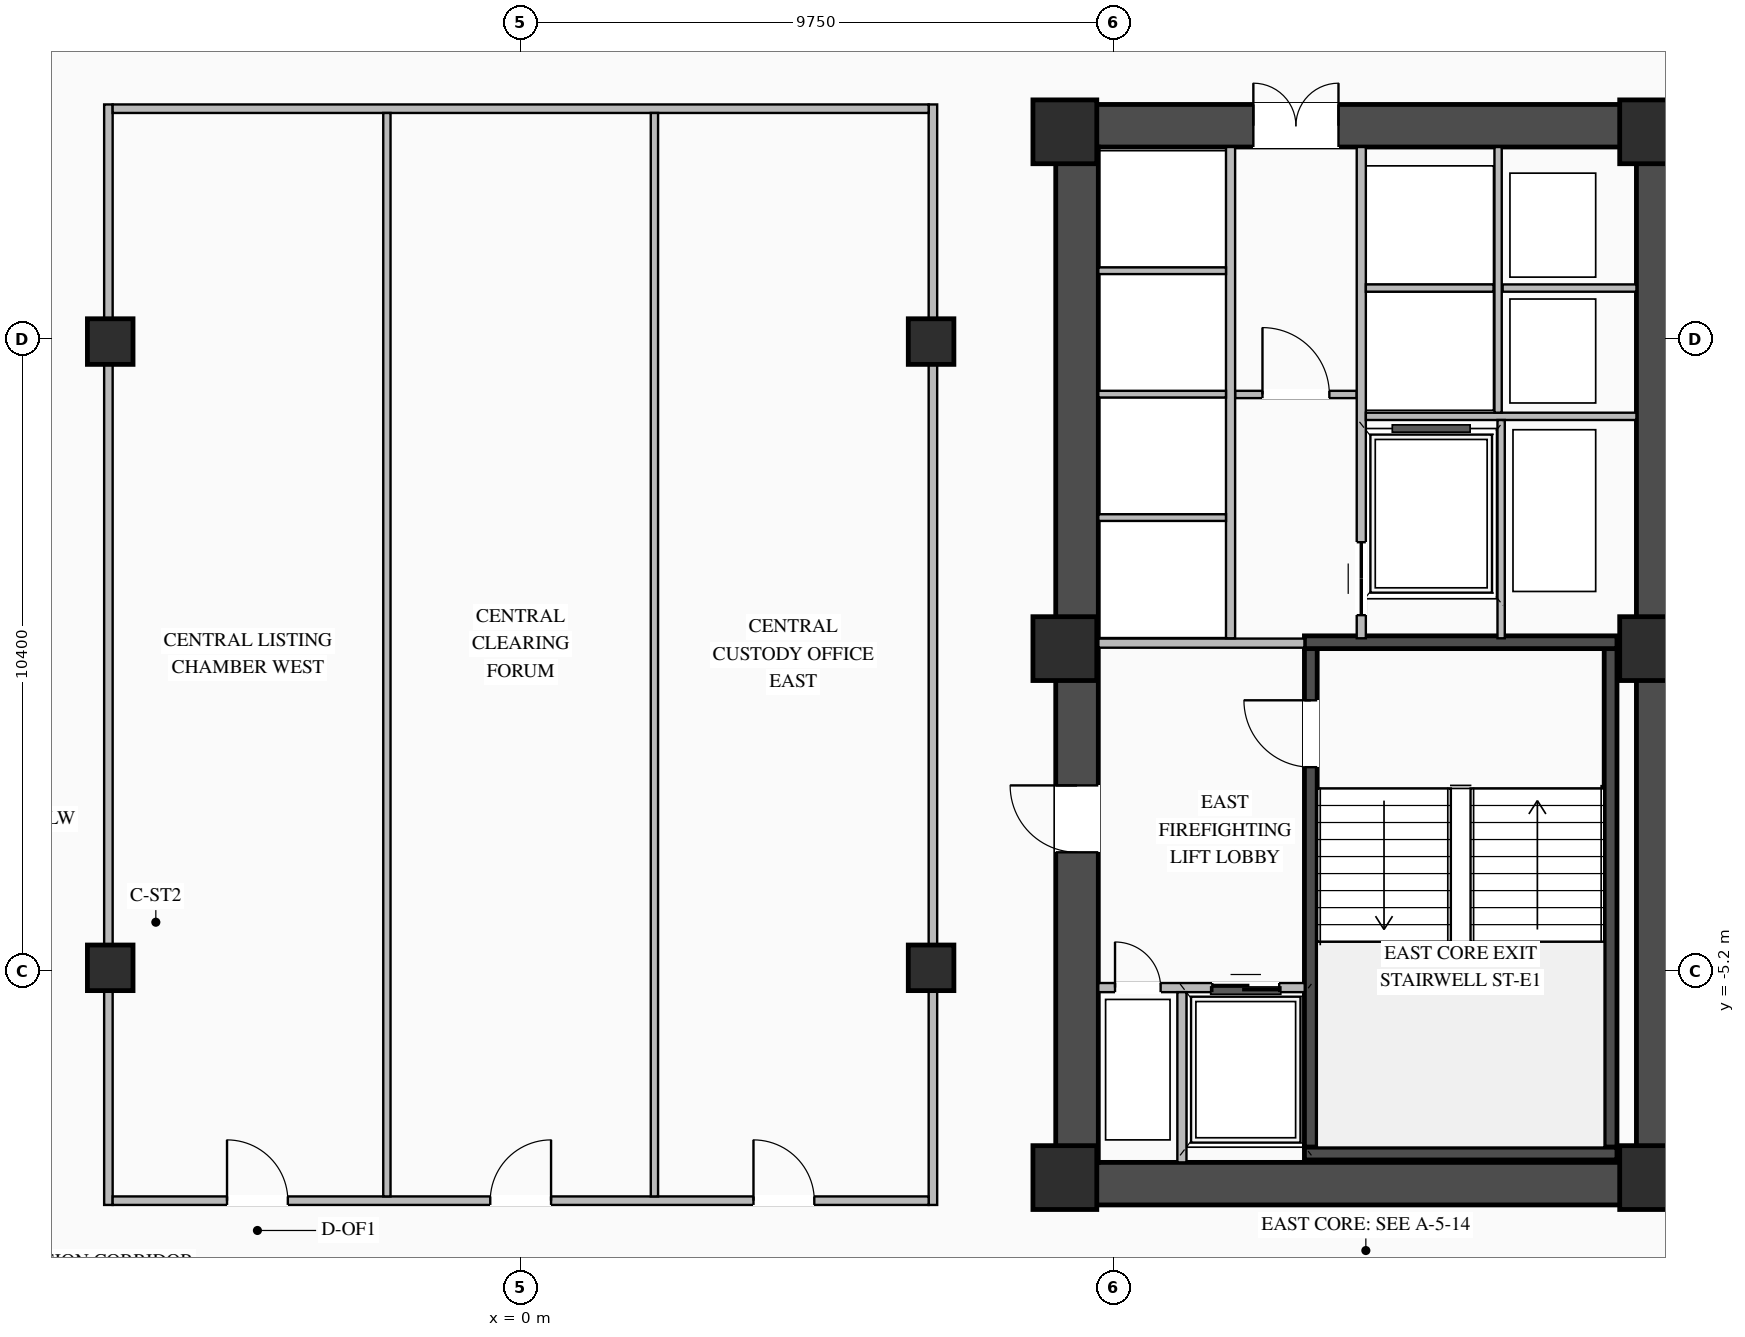
"""IFC4 building model, lengths in metres.
Left out: names, types, materials, properties, quantities, classifications, styles, units other than length and angle.
Written with IfcOpenShell. Run it as: python <this file> out.ifc"""

import sys

from ifc_helpers import new_model, si_unit, direction, frame, frame_2d, origin, origin_2d, place, context, subcontext, project, spatial, rectangle, i_section, extrude, element, fill, save


model = new_model("IFC4")
c1 = context("Model", 3, precision=1e-05, world=origin(), true_north=direction((0.0, 1.0)))
c2 = subcontext(c1, "Body", "Model", "MODEL_VIEW")
j1 = project(units=[si_unit("LENGTHUNIT", "METRE"), si_unit("PLANEANGLEUNIT", "RADIAN")], contexts=[c1])
p1 = place(None, origin())
s1 = spatial("IfcSite", under=j1, at=p1, CompositionType="ELEMENT")
p2 = place(p1, origin())
s2 = spatial("IfcBuilding", under=s1, at=p2, CompositionType="ELEMENT")
p3 = place(p2, frame((0.0, 0.0, 108.7)))
s3 = spatial("IfcBuildingStorey", under=s2, at=p3, CompositionType="ELEMENT", Elevation=108.7)
p4 = place(p3, frame((8.8, -8.7, 0.0), z_axis=(0.0, 0.0, 1.0), x_axis=(1.0, 0.0, 0.0)))
e1 = element("IfcWall", 1, at=p4, inside=s3, PredefinedType="SHEAR", context=c2, shape_type="SweptSolid", body=[
    extrude(rectangle(XDim=10.25, YDim=0.7, at=frame_2d((5.125, 0.0))), origin(), (0.0, 0.0, 1.0), 3.17),
])
p5 = place(p3, frame((8.8, 8.7, 0.0), z_axis=(0.0, 0.0, 1.0), x_axis=(1.0, 0.0, 0.0)))
e2 = element("IfcWall", 2, at=p5, inside=s3, PredefinedType="SHEAR", context=c2, shape_type="SweptSolid", body=[
    extrude(rectangle(XDim=10.25, YDim=0.7, at=frame_2d((5.125, 0.0))), origin(), (0.0, 0.0, 1.0), 3.17),
])
p6 = place(p5, frame((3.25, 0.0, 0.0)))
e3 = element("IfcOpeningElement", 3, at=p6, cuts=e2, PredefinedType="OPENING", context=c2, shape_type="SweptSolid", body=[
    extrude(rectangle(XDim=1.4, YDim=2.05, at=frame_2d((0.7, 1.025))), frame((0.0, 0.36, 0.0), z_axis=(0.0, -1.0, 0.0), x_axis=(1.0, 0.0, 0.0)), (0.0, 0.0, 1.0), 0.72),
])
p7 = place(p3, frame((9.15, -8.35, 0.0), z_axis=(0.0, 0.0, 1.0), x_axis=(0.0, 1.0, 0.0)))
e4 = element("IfcWall", 4, at=p7, inside=s3, PredefinedType="SHEAR", context=c2, shape_type="SweptSolid", body=[
    extrude(rectangle(XDim=16.7, YDim=0.7, at=frame_2d((8.35, 0.0))), origin(), (0.0, 0.0, 1.0), 3.17),
])
p8 = place(p7, frame((5.1, 0.0, 0.0)))
e5 = element("IfcOpeningElement", 5, at=p8, cuts=e4, PredefinedType="OPENING", context=c2, shape_type="SweptSolid", body=[
    extrude(rectangle(XDim=1.1, YDim=2.08, at=frame_2d((0.55, 1.04))), frame((0.0, 0.36, 0.0), z_axis=(0.0, -1.0, 0.0), x_axis=(1.0, 0.0, 0.0)), (0.0, 0.0, 1.0), 0.72),
])
p9 = place(p3, frame((18.7, -8.35, 0.0), z_axis=(0.0, 0.0, 1.0), x_axis=(0.0, 1.0, 0.0)))
e6 = element("IfcWall", 6, at=p9, inside=s3, PredefinedType="SHEAR", context=c2, shape_type="SweptSolid", body=[
    extrude(rectangle(XDim=16.7, YDim=0.7, at=frame_2d((8.35, 0.0))), origin(), (0.0, 0.0, 1.0), 3.17),
])
p10 = place(p3, frame((12.995, -8.1, 0.0), z_axis=(0.0, 0.0, 1.0), x_axis=(0.0, 1.0, 0.0)))
e7 = element("IfcWall", 7, at=p10, inside=s3, PredefinedType="SHEAR", context=c2, shape_type="SweptSolid", body=[
    extrude(rectangle(XDim=8.2, YDim=0.21, at=frame_2d((4.1, 0.0))), origin(), (0.0, 0.0, 1.0), 3.17),
])
p11 = place(p10, frame((6.25, 0.0, 0.0)))
e8 = element("IfcOpeningElement", 8, at=p11, cuts=e7, PredefinedType="OPENING", context=c2, shape_type="SweptSolid", body=[
    extrude(rectangle(XDim=1.1, YDim=2.15, at=frame_2d((0.55, 1.075))), frame((0.0, 0.115, 0.0), z_axis=(0.0, -1.0, 0.0), x_axis=(1.0, 0.0, 0.0)), (0.0, 0.0, 1.0), 0.23),
])
p12 = place(p3, frame((17.925, -8.1, 0.0), z_axis=(0.0, 0.0, 1.0), x_axis=(0.0, 1.0, 0.0)))
e9 = element("IfcWall", 9, at=p12, inside=s3, PredefinedType="SHEAR", context=c2, shape_type="SweptSolid", body=[
    extrude(rectangle(XDim=8.2, YDim=0.21, at=frame_2d((4.1, 0.0))), origin(), (0.0, 0.0, 1.0), 3.17),
])
for number, where, z_axis, x_axis in (
    (10, (12.89, -8.205, 0.0), (0.0, 0.0, 1.0), (1.0, 0.0, 0.0)),
    (11, (18.03, 0.205, 0.0), (0.0, 0.0, 1.0), (-1.0, 0.0, 0.0)),
):
    element("IfcWall", number, at=place(p3, frame(where, z_axis=z_axis, x_axis=x_axis)), inside=s3, PredefinedType="SHEAR", context=c2, shape_type="SweptSolid", body=[
        extrude(rectangle(XDim=5.14, YDim=0.21, at=frame_2d((2.57, 0.0))), origin(), (0.0, 0.0, 1.0), 3.17),
    ])
for number, where, z_axis, x_axis in (
    (12, (8.95, -8.6, 0.0), (0.0, 0.0, 1.0), (1.0, 0.0, 0.0)),
    (13, (8.95, 0.1, 0.0), (0.0, 0.0, 1.0), (1.0, 0.0, 0.0)),
    (14, (8.95, 8.6, 0.0), (0.0, 0.0, 1.0), (1.0, 0.0, 0.0)),
    (15, (18.6, -8.6, 0.0), (0.0, 0.0, 1.0), (1.0, 0.0, 0.0)),
    (16, (18.6, 0.1, 0.0), (0.0, 0.0, 1.0), (1.0, 0.0, 0.0)),
    (17, (18.6, 8.6, 0.0), (0.0, 0.0, 1.0), (1.0, 0.0, 0.0)),
):
    element("IfcColumn", number, at=place(p3, frame(where, z_axis=z_axis, x_axis=x_axis)), inside=s3, PredefinedType="COLUMN", context=c2, shape_type="SweptSolid", body=[
        extrude(rectangle(XDim=1.05, YDim=1.05, at=origin_2d()), origin(), (0.0, 0.0, 1.0), 3.45),
    ])
for number, where, z_axis, x_axis in (
    (18, (-6.75, -5.15, 0.0), (0.0, 0.0, 1.0), (1.0, 0.0, 0.0)),
    (19, (-6.75, 5.15, 0.0), (0.0, 0.0, 1.0), (1.0, 0.0, 0.0)),
    (20, (6.75, -5.15, 0.0), (0.0, 0.0, 1.0), (1.0, 0.0, 0.0)),
    (21, (6.75, 5.15, 0.0), (0.0, 0.0, 1.0), (1.0, 0.0, 0.0)),
):
    element("IfcColumn", number, at=place(p3, frame(where, z_axis=z_axis, x_axis=x_axis)), inside=s3, PredefinedType="COLUMN", context=c2, shape_type="SweptSolid", body=[
        extrude(i_section(OverallWidth=0.75, OverallDepth=0.75, WebThickness=0.03, FlangeThickness=0.044, at=origin_2d()), origin(), (0.0, 0.0, 1.0), 3.45),
    ])
p13 = place(p3, frame((9.5, -5.475, 0.0), z_axis=(0.0, 0.0, 1.0), x_axis=(1.0, 0.0, 0.0)))
e22 = element("IfcWall", 22, at=p13, inside=s3, PredefinedType="STANDARD", context=c2, shape_type="SweptSolid", body=[
    extrude(rectangle(XDim=3.395, YDim=0.15, at=frame_2d((1.698, 0.0))), origin(), (0.0, 0.0, 1.0), 3.15),
])
p14 = place(p13, frame((1.875, 0.0, 0.0)))
e23 = element("IfcOpeningElement", 23, at=p14, cuts=e22, PredefinedType="OPENING", context=c2, shape_type="SweptSolid", body=[
    extrude(rectangle(XDim=1.1, YDim=2.15, at=frame_2d((0.55, 1.075))), frame((0.0, 0.085, 0.0), z_axis=(0.0, -1.0, 0.0), x_axis=(1.0, 0.0, 0.0)), (0.0, 0.0, 1.0), 0.17),
])
p15 = place(p13, frame((0.275, 0.0, 0.0)))
e24 = element("IfcOpeningElement", 24, at=p15, cuts=e22, PredefinedType="OPENING", context=c2, shape_type="SweptSolid", body=[
    extrude(rectangle(XDim=0.75, YDim=2.05, at=frame_2d((0.375, 1.025))), frame((0.0, 0.085, 0.0), z_axis=(0.0, -1.0, 0.0), x_axis=(1.0, 0.0, 0.0)), (0.0, 0.0, 1.0), 0.17),
])
p16 = place(p3, frame((10.875, -8.35, 0.0), z_axis=(0.0, 0.0, 1.0), x_axis=(0.0, 1.0, 0.0)))
e25 = element("IfcWall", 25, at=p16, inside=s3, PredefinedType="STANDARD", context=c2, shape_type="SweptSolid", body=[
    extrude(rectangle(XDim=2.8, YDim=0.15, at=frame_2d((1.4, 0.0))), origin(), (0.0, 0.0, 1.0), 3.15),
])
p17 = place(p3, frame((9.5, 0.19, 0.0), z_axis=(0.0, 0.0, 1.0), x_axis=(1.0, 0.0, 0.0)))
e26 = element("IfcWall", 26, at=p17, inside=s3, PredefinedType="STANDARD", context=c2, shape_type="SweptSolid", body=[
    extrude(rectangle(XDim=3.39, YDim=0.15, at=frame_2d((1.695, 0.0))), origin(), (0.0, 0.0, 1.0), 2.545),
])
p18 = place(p3, frame((11.75, 4.28, 0.0), z_axis=(0.0, 0.0, 1.0), x_axis=(1.0, 0.0, 0.0)))
e27 = element("IfcWall", 27, at=p18, inside=s3, PredefinedType="STANDARD", context=c2, shape_type="SweptSolid", body=[
    extrude(rectangle(XDim=2.0, YDim=0.12, at=frame_2d((1.0, 0.0))), origin(), (0.0, 0.0, 1.0), 3.15),
])
p19 = place(p18, frame((0.45, 0.0, 0.0)))
e28 = element("IfcOpeningElement", 28, at=p19, cuts=e27, PredefinedType="OPENING", context=c2, shape_type="SweptSolid", body=[
    extrude(rectangle(XDim=1.1, YDim=2.1, at=frame_2d((0.55, 1.05))), frame((0.0, 0.07, 0.0), z_axis=(0.0, -1.0, 0.0), x_axis=(1.0, 0.0, 0.0)), (0.0, 0.0, 1.0), 0.14),
])
p20 = place(p3, frame((11.675, 0.27, 0.0), z_axis=(0.0, 0.0, 1.0), x_axis=(0.0, 1.0, 0.0)))
e29 = element("IfcWall", 29, at=p20, inside=s3, PredefinedType="STANDARD", context=c2, shape_type="SweptSolid", body=[
    extrude(rectangle(XDim=8.08, YDim=0.15, at=frame_2d((4.04, 0.0))), origin(), (0.0, 0.0, 1.0), 3.15),
])
for number, where, z_axis, x_axis in (
    (30, (9.5, 2.255, 0.0), (0.0, 0.0, 1.0), (1.0, 0.0, 0.0)),
    (31, (9.5, 4.285, 0.0), (0.0, 0.0, 1.0), (1.0, 0.0, 0.0)),
    (32, (9.5, 6.315, 0.0), (0.0, 0.0, 1.0), (1.0, 0.0, 0.0)),
):
    element("IfcWall", number, at=place(p3, frame(where, z_axis=z_axis, x_axis=x_axis)), inside=s3, PredefinedType="STANDARD", context=c2, shape_type="SweptSolid", body=[
        extrude(rectangle(XDim=2.1, YDim=0.11, at=frame_2d((1.05, 0.0))), origin(), (0.0, 0.0, 1.0), 3.15),
    ])
p21 = place(p3, frame((13.825, 0.27, 0.0), z_axis=(0.0, 0.0, 1.0), x_axis=(0.0, 1.0, 0.0)))
e33 = element("IfcWall", 33, at=p21, inside=s3, PredefinedType="STANDARD", context=c2, shape_type="SweptSolid", body=[
    extrude(rectangle(XDim=8.08, YDim=0.15, at=frame_2d((4.04, 0.0))), origin(), (0.0, 0.0, 1.0), 3.15),
])
p22 = place(p21, frame((0.38, 0.0, 0.0)))
e34 = element("IfcOpeningElement", 34, at=p22, cuts=e33, PredefinedType="OPENING", context=c2, shape_type="SweptSolid", body=[
    extrude(rectangle(XDim=1.2, YDim=2.1, at=frame_2d((0.6, 1.05))), frame((0.0, 0.085, 0.0), z_axis=(0.0, -1.0, 0.0), x_axis=(1.0, 0.0, 0.0)), (0.0, 0.0, 1.0), 0.17),
])
p23 = place(p3, frame((13.9, 3.92, 0.0), z_axis=(0.0, 0.0, 1.0), x_axis=(1.0, 0.0, 0.0)))
e35 = element("IfcWall", 35, at=p23, inside=s3, PredefinedType="STANDARD", context=c2, shape_type="SweptSolid", body=[
    extrude(rectangle(XDim=4.45, YDim=0.12, at=frame_2d((2.225, 0.0))), origin(), (0.0, 0.0, 1.0), 3.15),
])
p24 = place(p3, frame((16.15, 6.03, 0.0), z_axis=(0.0, 0.0, 1.0), x_axis=(1.0, 0.0, 0.0)))
e36 = element("IfcWall", 36, at=p24, inside=s3, PredefinedType="STANDARD", context=c2, shape_type="SweptSolid", body=[
    extrude(rectangle(XDim=2.2, YDim=0.12, at=frame_2d((1.1, 0.0))), origin(), (0.0, 0.0, 1.0), 3.15),
])
p25 = place(p3, frame((16.075, 3.98, 0.0), z_axis=(0.0, 0.0, 1.0), x_axis=(0.0, 1.0, 0.0)))
e37 = element("IfcWall", 37, at=p25, inside=s3, PredefinedType="STANDARD", context=c2, shape_type="SweptSolid", body=[
    extrude(rectangle(XDim=4.37, YDim=0.12, at=frame_2d((2.185, 0.0))), origin(), (0.0, 0.0, 1.0), 3.15),
])
p26 = place(p3, frame((13.9, 6.03, 0.0), z_axis=(0.0, 0.0, 1.0), x_axis=(1.0, 0.0, 0.0)))
e38 = element("IfcWall", 38, at=p26, inside=s3, PredefinedType="STANDARD", context=c2, shape_type="SweptSolid", body=[
    extrude(rectangle(XDim=2.1, YDim=0.12, at=frame_2d((1.05, 0.0))), origin(), (0.0, 0.0, 1.0), 3.15),
])
p27 = place(p3, frame((16.125, 0.27, 0.0), z_axis=(0.0, 0.0, 1.0), x_axis=(0.0, 1.0, 0.0)))
e39 = element("IfcWall", 39, at=p27, inside=s3, PredefinedType="STANDARD", context=c2, shape_type="SweptSolid", body=[
    extrude(rectangle(XDim=3.59, YDim=0.12, at=frame_2d((1.795, 0.0))), origin(), (0.0, 0.0, 1.0), 3.15),
])
for number, where, z_axis, x_axis in (
    (40, (-6.78, -9.05, 0.0), (0.0, 0.0, 1.0), (0.0, 1.0, 0.0)),
    (41, (6.78, -9.05, 0.0), (0.0, 0.0, 1.0), (0.0, 1.0, 0.0)),
):
    element("IfcWall", number, at=place(p3, frame(where, z_axis=z_axis, x_axis=x_axis)), inside=s3, PredefinedType="STANDARD", context=c2, shape_type="SweptSolid", body=[
        extrude(rectangle(XDim=18.1, YDim=0.14, at=frame_2d((9.05, 0.0))), origin(), (0.0, 0.0, 1.0), 2.545),
    ])
p28 = place(p3, frame((-6.71, -8.98, 0.0), z_axis=(0.0, 0.0, 1.0), x_axis=(1.0, 0.0, 0.0)))
e42 = element("IfcWall", 42, at=p28, inside=s3, PredefinedType="STANDARD", context=c2, shape_type="SweptSolid", body=[
    extrude(rectangle(XDim=13.42, YDim=0.14, at=frame_2d((6.71, 0.0))), origin(), (0.0, 0.0, 1.0), 3.15),
])
p29 = place(p28, frame((1.881, 0.0, 0.0)))
e43 = element("IfcOpeningElement", 43, at=p29, cuts=e42, PredefinedType="OPENING", context=c2, shape_type="SweptSolid", body=[
    extrude(rectangle(XDim=1.0, YDim=2.08, at=frame_2d((0.5, 1.04))), frame((0.0, 0.08, 0.0), z_axis=(0.0, -1.0, 0.0), x_axis=(1.0, 0.0, 0.0)), (0.0, 0.0, 1.0), 0.16),
])
p30 = place(p28, frame((6.21, 0.0, 0.0)))
e44 = element("IfcOpeningElement", 44, at=p30, cuts=e42, PredefinedType="OPENING", context=c2, shape_type="SweptSolid", body=[
    extrude(rectangle(XDim=1.0, YDim=2.08, at=frame_2d((0.5, 1.04))), frame((0.0, 0.08, 0.0), z_axis=(0.0, -1.0, 0.0), x_axis=(1.0, 0.0, 0.0)), (0.0, 0.0, 1.0), 0.16),
])
p31 = place(p28, frame((10.539, 0.0, 0.0)))
e45 = element("IfcOpeningElement", 45, at=p31, cuts=e42, PredefinedType="OPENING", context=c2, shape_type="SweptSolid", body=[
    extrude(rectangle(XDim=1.0, YDim=2.08, at=frame_2d((0.5, 1.04))), frame((0.0, 0.08, 0.0), z_axis=(0.0, -1.0, 0.0), x_axis=(1.0, 0.0, 0.0)), (0.0, 0.0, 1.0), 0.16),
])
p32 = place(p3, frame((-6.71, 8.98, 0.0), z_axis=(0.0, 0.0, 1.0), x_axis=(1.0, 0.0, 0.0)))
e46 = element("IfcWall", 46, at=p32, inside=s3, PredefinedType="STANDARD", context=c2, shape_type="SweptSolid", body=[
    extrude(rectangle(XDim=13.42, YDim=0.14, at=frame_2d((6.71, 0.0))), origin(), (0.0, 0.0, 1.0), 3.15),
])
for number, where, z_axis, x_axis in (
    (47, (-2.2, -8.91, 0.0), (0.0, 0.0, 1.0), (0.0, 1.0, 0.0)),
    (48, (2.2, -8.91, 0.0), (0.0, 0.0, 1.0), (0.0, 1.0, 0.0)),
):
    element("IfcWall", number, at=place(p3, frame(where, z_axis=z_axis, x_axis=x_axis)), inside=s3, PredefinedType="STANDARD", context=c2, shape_type="SweptSolid", body=[
        extrude(rectangle(XDim=17.82, YDim=0.12, at=frame_2d((8.91, 0.0))), origin(), (0.0, 0.0, 1.0), 3.15),
    ])
p33 = place(p11, origin())
e49 = element("IfcDoor", 49, at=p33, inside=s3, OperationType="SINGLE_SWING_RIGHT", PredefinedType="DOOR", context=c2, shape_type="SweptSolid", body=[
    extrude(rectangle(XDim=1.1, YDim=2.15, at=frame_2d((0.55, 1.075))), frame((0.0, 0.025, 0.0), z_axis=(0.0, -1.0, 0.0), x_axis=(1.0, 0.0, 0.0)), (0.0, 0.0, 1.0), 0.05),
])
fill(e8, e49)
p34 = place(p14, origin())
e50 = element("IfcDoor", 50, at=p34, inside=s3, OperationType="DOUBLE_DOOR_SLIDING", PredefinedType="DOOR", context=c2, shape_type="SweptSolid", body=[
    extrude(rectangle(XDim=1.1, YDim=2.15, at=frame_2d((0.55, 1.075))), frame((0.0, 0.025, 0.0), z_axis=(0.0, -1.0, 0.0), x_axis=(1.0, 0.0, 0.0)), (0.0, 0.0, 1.0), 0.05),
])
fill(e23, e50)
p35 = place(p15, origin())
e51 = element("IfcDoor", 51, at=p35, inside=s3, OperationType="SINGLE_SWING_LEFT", PredefinedType="DOOR", context=c2, shape_type="SweptSolid", body=[
    extrude(rectangle(XDim=0.75, YDim=2.05, at=frame_2d((0.375, 1.025))), frame((0.0, 0.025, 0.0), z_axis=(0.0, -1.0, 0.0), x_axis=(1.0, 0.0, 0.0)), (0.0, 0.0, 1.0), 0.05),
])
fill(e24, e51)
p36 = place(p8, origin())
e52 = element("IfcDoor", 52, at=p36, inside=s3, OperationType="SINGLE_SWING_RIGHT", PredefinedType="DOOR", context=c2, shape_type="SweptSolid", body=[
    extrude(rectangle(XDim=1.1, YDim=2.08, at=frame_2d((0.55, 1.04))), frame((0.0, -0.255, 0.0), z_axis=(0.0, -1.0, 0.0), x_axis=(1.0, 0.0, 0.0)), (0.0, 0.0, 1.0), 0.05),
])
fill(e5, e52)
p37 = place(p19, origin())
e53 = element("IfcDoor", 53, at=p37, inside=s3, OperationType="SINGLE_SWING_LEFT", PredefinedType="DOOR", context=c2, shape_type="SweptSolid", body=[
    extrude(rectangle(XDim=1.1, YDim=2.1, at=frame_2d((0.55, 1.05))), frame((0.0, 0.025, 0.0), z_axis=(0.0, -1.0, 0.0), x_axis=(1.0, 0.0, 0.0)), (0.0, 0.0, 1.0), 0.05),
])
fill(e28, e53)
p38 = place(p6, origin())
e54 = element("IfcDoor", 54, at=p38, inside=s3, OperationType="DOUBLE_DOOR_SINGLE_SWING", PredefinedType="DOOR", context=c2, shape_type="SweptSolid", body=[
    extrude(rectangle(XDim=1.4, YDim=2.05, at=frame_2d((0.7, 1.025))), frame((0.0, 0.295, 0.0), z_axis=(0.0, -1.0, 0.0), x_axis=(1.0, 0.0, 0.0)), (0.0, 0.0, 1.0), 0.05),
])
fill(e3, e54)
p39 = place(p22, origin())
e55 = element("IfcDoor", 55, at=p39, inside=s3, OperationType="DOUBLE_DOOR_SLIDING", PredefinedType="DOOR", context=c2, shape_type="SweptSolid", body=[
    extrude(rectangle(XDim=1.2, YDim=2.1, at=frame_2d((0.6, 1.05))), frame((0.0, 0.025, 0.0), z_axis=(0.0, -1.0, 0.0), x_axis=(1.0, 0.0, 0.0)), (0.0, 0.0, 1.0), 0.05),
])
fill(e34, e55)
p40 = place(p29, origin())
e56 = element("IfcDoor", 56, at=p40, inside=s3, OperationType="SINGLE_SWING_LEFT", PredefinedType="DOOR", context=c2, shape_type="SweptSolid", body=[
    extrude(rectangle(XDim=1.0, YDim=2.08, at=frame_2d((0.5, 1.04))), frame((0.0, 0.025, 0.0), z_axis=(0.0, -1.0, 0.0), x_axis=(1.0, 0.0, 0.0)), (0.0, 0.0, 1.0), 0.05),
])
fill(e43, e56)
p41 = place(p30, origin())
e57 = element("IfcDoor", 57, at=p41, inside=s3, OperationType="SINGLE_SWING_RIGHT", PredefinedType="DOOR", context=c2, shape_type="SweptSolid", body=[
    extrude(rectangle(XDim=1.0, YDim=2.08, at=frame_2d((0.5, 1.04))), frame((0.0, 0.025, 0.0), z_axis=(0.0, -1.0, 0.0), x_axis=(1.0, 0.0, 0.0)), (0.0, 0.0, 1.0), 0.05),
])
fill(e44, e57)
p42 = place(p31, origin())
e58 = element("IfcDoor", 58, at=p42, inside=s3, OperationType="SINGLE_SWING_LEFT", PredefinedType="DOOR", context=c2, shape_type="SweptSolid", body=[
    extrude(rectangle(XDim=1.0, YDim=2.08, at=frame_2d((0.5, 1.04))), frame((0.0, 0.025, 0.0), z_axis=(0.0, -1.0, 0.0), x_axis=(1.0, 0.0, 0.0)), (0.0, 0.0, 1.0), 0.05),
])
fill(e45, e58)
save(model, sys.argv[1])
